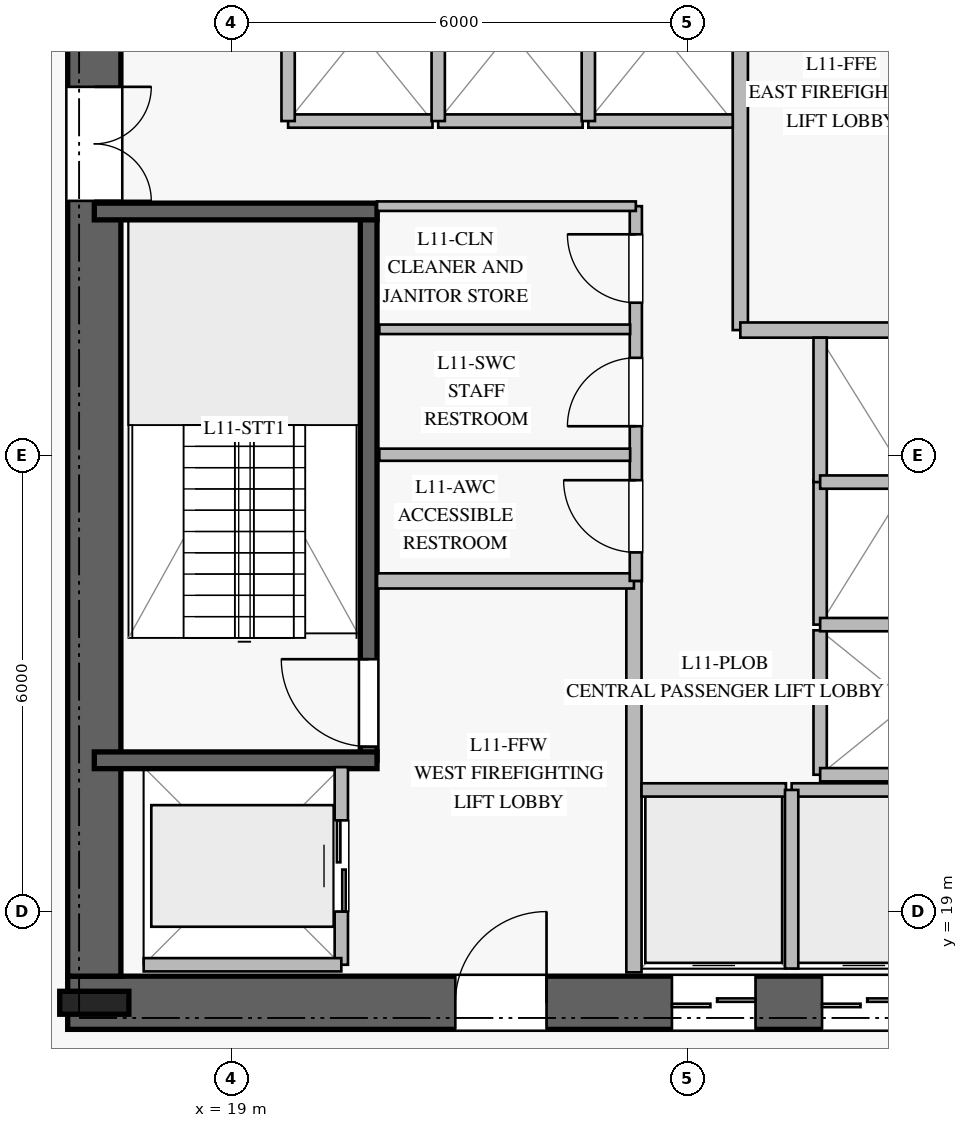
"""IFC4 building model, lengths in metres.
Left out: names, types, materials, properties, quantities, classifications, styles, units other than length and angle.
Written with IfcOpenShell. Run it as: python <this file> out.ifc"""

import sys

from ifc_helpers import new_model, si_unit, direction, frame, frame_2d, origin, origin_2d, place, context, subcontext, project, spatial, rectangle, i_section, extrude, element, fill, save


model = new_model("IFC4")
c1 = context("Model", 3, precision=1e-05, world=origin(), true_north=direction((0.0, 1.0)))
c2 = subcontext(c1, "Body", "Model", "MODEL_VIEW")
j1 = project(units=[si_unit("LENGTHUNIT", "METRE"), si_unit("PLANEANGLEUNIT", "RADIAN")], contexts=[c1])
p1 = place(None, origin())
s1 = spatial("IfcSite", under=j1, at=p1, CompositionType="ELEMENT")
p2 = place(p1, origin())
s2 = spatial("IfcBuilding", under=s1, at=p2, CompositionType="ELEMENT")
p3 = place(p2, frame((0.0, 0.0, 48.0)))
s3 = spatial("IfcBuildingStorey", under=s2, at=p3, CompositionType="ELEMENT", Elevation=48.0)
p4 = place(p3, frame((16.85, 17.8, 0.0), z_axis=(0.0, 0.0, 1.0), x_axis=(1.0, 0.0, 0.0)))
e1 = element("IfcWall", 1, at=p4, inside=s3, PredefinedType="SHEAR", context=c2, shape_type="SweptSolid", body=[
    extrude(rectangle(XDim=16.3, YDim=0.7, at=frame_2d((8.15, 0.0))), origin(), (0.0, 0.0, 1.0), 3.76),
])
p5 = place(p4, frame((5.1, 0.0, 0.0)))
e2 = element("IfcOpeningElement", 2, at=p5, cuts=e1, PredefinedType="OPENING", context=c2, shape_type="SweptSolid", body=[
    extrude(rectangle(XDim=1.2, YDim=2.25, at=frame_2d((0.6, 1.125))), frame((0.0, 0.36, 0.0), z_axis=(0.0, -1.0, 0.0), x_axis=(1.0, 0.0, 0.0)), (0.0, 0.0, 1.0), 0.72),
])
p6 = place(p4, frame((14.05, 0.0, 0.0)))
e3 = element("IfcOpeningElement", 3, at=p6, cuts=e1, PredefinedType="OPENING", context=c2, shape_type="SweptSolid", body=[
    extrude(rectangle(XDim=0.9, YDim=2.1, at=frame_2d((0.45, 1.05))), frame((0.0, 0.36, 0.0), z_axis=(0.0, -1.0, 0.0), x_axis=(1.0, 0.0, 0.0)), (0.0, 0.0, 1.0), 0.72),
])
p7 = place(p4, frame((7.95, 0.0, 0.0)))
e4 = element("IfcOpeningElement", 4, at=p7, cuts=e1, PredefinedType="OPENING", context=c2, shape_type="SweptSolid", body=[
    extrude(rectangle(XDim=1.1, YDim=2.2, at=frame_2d((0.55, 1.1))), frame((0.0, 0.36, 0.0), z_axis=(0.0, -1.0, 0.0), x_axis=(1.0, 0.0, 0.0)), (0.0, 0.0, 1.0), 0.72),
])
p8 = place(p4, frame((9.925, 0.0, 0.0)))
e5 = element("IfcOpeningElement", 5, at=p8, cuts=e1, PredefinedType="OPENING", context=c2, shape_type="SweptSolid", body=[
    extrude(rectangle(XDim=1.1, YDim=2.2, at=frame_2d((0.55, 1.1))), frame((0.0, 0.36, 0.0), z_axis=(0.0, -1.0, 0.0), x_axis=(1.0, 0.0, 0.0)), (0.0, 0.0, 1.0), 0.72),
])
p9 = place(p4, frame((11.9, 0.0, 0.0)))
e6 = element("IfcOpeningElement", 6, at=p9, cuts=e1, PredefinedType="OPENING", context=c2, shape_type="SweptSolid", body=[
    extrude(rectangle(XDim=1.1, YDim=2.2, at=frame_2d((0.55, 1.1))), frame((0.0, 0.36, 0.0), z_axis=(0.0, -1.0, 0.0), x_axis=(1.0, 0.0, 0.0)), (0.0, 0.0, 1.0), 0.72),
])
p10 = place(p3, frame((17.2, 31.85, 0.0), z_axis=(0.0, 0.0, 1.0), x_axis=(0.0, -1.0, 0.0)))
e7 = element("IfcWall", 7, at=p10, inside=s3, PredefinedType="SHEAR", context=c2, shape_type="SweptSolid", body=[
    extrude(rectangle(XDim=13.7, YDim=0.7, at=frame_2d((6.85, 0.0))), origin(), (0.0, 0.0, 1.0), 3.76),
])
p11 = place(p10, frame((2.0, 0.0, 0.0)))
e8 = element("IfcOpeningElement", 8, at=p11, cuts=e7, PredefinedType="OPENING", context=c2, shape_type="SweptSolid", body=[
    extrude(rectangle(XDim=1.5, YDim=2.2, at=frame_2d((0.75, 1.1))), frame((0.0, 0.36, 0.0), z_axis=(0.0, -1.0, 0.0), x_axis=(1.0, 0.0, 0.0)), (0.0, 0.0, 1.0), 0.72),
])
p12 = place(p3, frame((17.2, 17.8, 0.0), z_axis=(0.0, 0.0, 1.0), x_axis=(1.0, 0.0, 0.0)))
e9 = element("IfcColumn", 9, at=p12, inside=s3, PredefinedType="COLUMN", context=c2, shape_type="SweptSolid", body=[
    extrude(i_section(OverallWidth=0.302, OverallDepth=0.91, WebThickness=0.021, FlangeThickness=0.04, at=origin_2d()), origin(), (0.0, 0.0, 1.0), 4.0),
])
p13 = place(p3, frame((20.81, 20.99, 0.0), z_axis=(0.0, 0.0, 1.0), x_axis=(0.0, 1.0, 0.0)))
e10 = element("IfcWall", 10, at=p13, inside=s3, PredefinedType="SOLIDWALL", context=c2, shape_type="SweptSolid", body=[
    extrude(rectangle(XDim=7.22, YDim=0.22, at=frame_2d((3.61, 0.0))), origin(), (0.0, 0.0, 1.0), 3.76),
])
p14 = place(p13, frame((0.18, 0.0, 0.0)))
e11 = element("IfcOpeningElement", 11, at=p14, cuts=e10, PredefinedType="OPENING", context=c2, shape_type="SweptSolid", body=[
    extrude(rectangle(XDim=1.15, YDim=2.2, at=frame_2d((0.575, 1.1))), frame((0.0, 0.12, 0.0), z_axis=(0.0, -1.0, 0.0), x_axis=(1.0, 0.0, 0.0)), (0.0, 0.0, 1.0), 0.24),
])
for number, where, z_axis, x_axis in (
    (12, (17.2, 20.99, 0.0), (0.0, 0.0, 1.0), (1.0, 0.0, 0.0)),
    (13, (17.2, 28.21, 0.0), (0.0, 0.0, 1.0), (1.0, 0.0, 0.0)),
):
    element("IfcWall", number, at=place(p3, frame(where, z_axis=z_axis, x_axis=x_axis)), inside=s3, PredefinedType="SOLIDWALL", context=c2, shape_type="SweptSolid", body=[
        extrude(rectangle(XDim=3.72, YDim=0.22, at=frame_2d((1.86, 0.0))), origin(), (0.0, 0.0, 1.0), 3.76),
    ])
p15 = place(p3, frame((24.3, 18.2, 0.0), z_axis=(0.0, 0.0, 1.0), x_axis=(0.0, 1.0, 0.0)))
e14 = element("IfcWall", 14, at=p15, inside=s3, PredefinedType="PARTITIONING", context=c2, shape_type="SweptSolid", body=[
    extrude(rectangle(XDim=5.15, YDim=0.2, at=frame_2d((2.575, 0.0))), origin(), (0.0, 0.0, 1.0), 3.76),
])
p16 = place(p3, frame((20.92, 23.35, 0.0), z_axis=(0.0, 0.0, 1.0), x_axis=(1.0, 0.0, 0.0)))
e15 = element("IfcWall", 15, at=p16, inside=s3, PredefinedType="PARTITIONING", context=c2, shape_type="SweptSolid", body=[
    extrude(rectangle(XDim=3.38, YDim=0.2, at=frame_2d((1.69, 0.0))), origin(), (0.0, 0.0, 1.0), 3.76),
])
p17 = place(p3, frame((25.7, 26.65, 0.0), z_axis=(0.0, 0.0, 1.0), x_axis=(0.0, 1.0, 0.0)))
e16 = element("IfcWall", 16, at=p17, inside=s3, PredefinedType="PARTITIONING", context=c2, shape_type="SweptSolid", body=[
    extrude(rectangle(XDim=5.15, YDim=0.2, at=frame_2d((2.575, 0.0))), origin(), (0.0, 0.0, 1.0), 3.76),
])
p18 = place(p3, frame((25.7, 26.65, 0.0), z_axis=(0.0, 0.0, 1.0), x_axis=(1.0, 0.0, 0.0)))
e17 = element("IfcWall", 17, at=p18, inside=s3, PredefinedType="PARTITIONING", context=c2, shape_type="SweptSolid", body=[
    extrude(rectangle(XDim=3.38, YDim=0.2, at=frame_2d((1.69, 0.0))), origin(), (0.0, 0.0, 1.0), 3.76),
])
p19 = place(p3, frame((24.325, 23.35, 0.0), z_axis=(0.0, 0.0, 1.0), x_axis=(0.0, 1.0, 0.0)))
e18 = element("IfcWall", 18, at=p19, inside=s3, PredefinedType="PLUMBINGWALL", context=c2, shape_type="SweptSolid", body=[
    extrude(rectangle(XDim=4.93, YDim=0.16, at=frame_2d((2.465, 0.0))), origin(), (0.0, 0.0, 1.0), 3.76),
])
p20 = place(p19, frame((0.375, 0.0, 0.0)))
e19 = element("IfcOpeningElement", 19, at=p20, cuts=e18, PredefinedType="OPENING", context=c2, shape_type="SweptSolid", body=[
    extrude(rectangle(XDim=0.95, YDim=2.1, at=frame_2d((0.475, 1.05))), frame((0.0, 0.09, 0.0), z_axis=(0.0, -1.0, 0.0), x_axis=(1.0, 0.0, 0.0)), (0.0, 0.0, 1.0), 0.18),
])
p21 = place(p19, frame((2.035, 0.0, 0.0)))
e20 = element("IfcOpeningElement", 20, at=p21, cuts=e18, PredefinedType="OPENING", context=c2, shape_type="SweptSolid", body=[
    extrude(rectangle(XDim=0.9, YDim=2.1, at=frame_2d((0.45, 1.05))), frame((0.0, 0.09, 0.0), z_axis=(0.0, -1.0, 0.0), x_axis=(1.0, 0.0, 0.0)), (0.0, 0.0, 1.0), 0.18),
])
p22 = place(p19, frame((3.66, 0.0, 0.0)))
e21 = element("IfcOpeningElement", 21, at=p22, cuts=e18, PredefinedType="OPENING", context=c2, shape_type="SweptSolid", body=[
    extrude(rectangle(XDim=0.9, YDim=2.1, at=frame_2d((0.45, 1.05))), frame((0.0, 0.09, 0.0), z_axis=(0.0, -1.0, 0.0), x_axis=(1.0, 0.0, 0.0)), (0.0, 0.0, 1.0), 0.18),
])
p23 = place(p3, frame((20.92, 28.28, 0.0), z_axis=(0.0, 0.0, 1.0), x_axis=(1.0, 0.0, 0.0)))
e22 = element("IfcWall", 22, at=p23, inside=s3, PredefinedType="PARTITIONING", context=c2, shape_type="SweptSolid", body=[
    extrude(rectangle(XDim=3.405, YDim=0.125, at=frame_2d((1.703, 0.0))), origin(), (0.0, 0.0, 1.0), 3.76),
])
p24 = place(p3, frame((20.95, 25.01, 0.0), z_axis=(0.0, 0.0, 1.0), x_axis=(1.0, 0.0, 0.0)))
e23 = element("IfcWall", 23, at=p24, inside=s3, PredefinedType="PLUMBINGWALL", context=c2, shape_type="SweptSolid", body=[
    extrude(rectangle(XDim=3.3, YDim=0.16, at=frame_2d((1.65, 0.0))), origin(), (0.0, 0.0, 1.0), 3.76),
])
p25 = place(p3, frame((20.95, 26.66, 0.0), z_axis=(0.0, 0.0, 1.0), x_axis=(1.0, 0.0, 0.0)))
e24 = element("IfcWall", 24, at=p25, inside=s3, PredefinedType="PARTITIONING", context=c2, shape_type="SweptSolid", body=[
    extrude(rectangle(XDim=3.3, YDim=0.125, at=frame_2d((1.65, 0.0))), origin(), (0.0, 0.0, 1.0), 3.76),
])
p26 = place(p3, frame((24.4, 20.6, 0.0), z_axis=(0.0, 0.0, 1.0), x_axis=(1.0, 0.0, 0.0)))
e25 = element("IfcWall", 25, at=p26, inside=s3, PredefinedType="PARTITIONING", context=c2, shape_type="SweptSolid", body=[
    extrude(rectangle(XDim=1.9, YDim=0.175, at=frame_2d((0.95, 0.0))), origin(), (0.0, 0.0, 1.0), 3.76),
])
p27 = place(p3, frame((26.375, 20.6, 0.0), z_axis=(0.0, 0.0, 1.0), x_axis=(1.0, 0.0, 0.0)))
e26 = element("IfcWall", 26, at=p27, inside=s3, PredefinedType="PARTITIONING", context=c2, shape_type="SweptSolid", body=[
    extrude(rectangle(XDim=1.9, YDim=0.175, at=frame_2d((0.95, 0.0))), origin(), (0.0, 0.0, 1.0), 3.76),
])
p28 = place(p3, frame((26.375, 18.25, 0.0), z_axis=(0.0, 0.0, 1.0), x_axis=(0.0, 1.0, 0.0)))
e27 = element("IfcWall", 27, at=p28, inside=s3, PredefinedType="PARTITIONING", context=c2, shape_type="SweptSolid", body=[
    extrude(rectangle(XDim=2.35, YDim=0.175, at=frame_2d((1.175, 0.0))), origin(), (0.0, 0.0, 1.0), 3.76),
])
p29 = place(p3, frame((19.75, 29.4, 0.0), z_axis=(0.0, 0.0, 1.0), x_axis=(1.0, 0.0, 0.0)))
e28 = element("IfcWall", 28, at=p29, inside=s3, PredefinedType="PARTITIONING", context=c2, shape_type="SweptSolid", body=[
    extrude(rectangle(XDim=1.9, YDim=0.175, at=frame_2d((0.95, 0.0))), origin(), (0.0, 0.0, 1.0), 3.76),
])
p30 = place(p3, frame((19.75, 29.4, 0.0), z_axis=(0.0, 0.0, 1.0), x_axis=(0.0, 1.0, 0.0)))
e29 = element("IfcWall", 29, at=p30, inside=s3, PredefinedType="PARTITIONING", context=c2, shape_type="SweptSolid", body=[
    extrude(rectangle(XDim=2.35, YDim=0.175, at=frame_2d((1.175, 0.0))), origin(), (0.0, 0.0, 1.0), 3.76),
])
p31 = place(p3, frame((21.725, 29.4, 0.0), z_axis=(0.0, 0.0, 1.0), x_axis=(1.0, 0.0, 0.0)))
e30 = element("IfcWall", 30, at=p31, inside=s3, PredefinedType="PARTITIONING", context=c2, shape_type="SweptSolid", body=[
    extrude(rectangle(XDim=1.9, YDim=0.175, at=frame_2d((0.95, 0.0))), origin(), (0.0, 0.0, 1.0), 3.76),
])
p32 = place(p3, frame((21.725, 29.4, 0.0), z_axis=(0.0, 0.0, 1.0), x_axis=(0.0, 1.0, 0.0)))
e31 = element("IfcWall", 31, at=p32, inside=s3, PredefinedType="PARTITIONING", context=c2, shape_type="SweptSolid", body=[
    extrude(rectangle(XDim=2.35, YDim=0.175, at=frame_2d((1.175, 0.0))), origin(), (0.0, 0.0, 1.0), 3.76),
])
p33 = place(p3, frame((23.7, 29.4, 0.0), z_axis=(0.0, 0.0, 1.0), x_axis=(1.0, 0.0, 0.0)))
e32 = element("IfcWall", 32, at=p33, inside=s3, PredefinedType="PARTITIONING", context=c2, shape_type="SweptSolid", body=[
    extrude(rectangle(XDim=1.9, YDim=0.175, at=frame_2d((0.95, 0.0))), origin(), (0.0, 0.0, 1.0), 3.76),
])
p34 = place(p3, frame((23.7, 29.4, 0.0), z_axis=(0.0, 0.0, 1.0), x_axis=(0.0, 1.0, 0.0)))
e33 = element("IfcWall", 33, at=p34, inside=s3, PredefinedType="PARTITIONING", context=c2, shape_type="SweptSolid", body=[
    extrude(rectangle(XDim=2.35, YDim=0.175, at=frame_2d((1.175, 0.0))), origin(), (0.0, 0.0, 1.0), 3.76),
])
p35 = place(p3, frame((26.75, 20.8, 0.0), z_axis=(0.0, 0.0, 1.0), x_axis=(0.0, 1.0, 0.0)))
e34 = element("IfcWall", 34, at=p35, inside=s3, PredefinedType="PARTITIONING", context=c2, shape_type="SweptSolid", body=[
    extrude(rectangle(XDim=1.9, YDim=0.175, at=frame_2d((0.95, 0.0))), origin(), (0.0, 0.0, 1.0), 3.76),
])
p36 = place(p3, frame((26.75, 20.8, 0.0), z_axis=(0.0, 0.0, 1.0), x_axis=(1.0, 0.0, 0.0)))
e35 = element("IfcWall", 35, at=p36, inside=s3, PredefinedType="PARTITIONING", context=c2, shape_type="SweptSolid", body=[
    extrude(rectangle(XDim=2.35, YDim=0.175, at=frame_2d((1.175, 0.0))), origin(), (0.0, 0.0, 1.0), 3.76),
])
p37 = place(p3, frame((26.75, 22.775, 0.0), z_axis=(0.0, 0.0, 1.0), x_axis=(0.0, 1.0, 0.0)))
e36 = element("IfcWall", 36, at=p37, inside=s3, PredefinedType="PARTITIONING", context=c2, shape_type="SweptSolid", body=[
    extrude(rectangle(XDim=1.9, YDim=0.175, at=frame_2d((0.95, 0.0))), origin(), (0.0, 0.0, 1.0), 3.76),
])
p38 = place(p3, frame((26.75, 22.775, 0.0), z_axis=(0.0, 0.0, 1.0), x_axis=(1.0, 0.0, 0.0)))
e37 = element("IfcWall", 37, at=p38, inside=s3, PredefinedType="PARTITIONING", context=c2, shape_type="SweptSolid", body=[
    extrude(rectangle(XDim=2.35, YDim=0.175, at=frame_2d((1.175, 0.0))), origin(), (0.0, 0.0, 1.0), 3.76),
])
p39 = place(p3, frame((26.75, 24.65, 0.0), z_axis=(0.0, 0.0, 1.0), x_axis=(0.0, 1.0, 0.0)))
e38 = element("IfcWall", 38, at=p39, inside=s3, PredefinedType="PARTITIONING", context=c2, shape_type="SweptSolid", body=[
    extrude(rectangle(XDim=1.9, YDim=0.175, at=frame_2d((0.95, 0.0))), origin(), (0.0, 0.0, 1.0), 3.76),
])
p40 = place(p3, frame((26.75, 24.65, 0.0), z_axis=(0.0, 0.0, 1.0), x_axis=(1.0, 0.0, 0.0)))
e39 = element("IfcWall", 39, at=p40, inside=s3, PredefinedType="PARTITIONING", context=c2, shape_type="SweptSolid", body=[
    extrude(rectangle(XDim=2.35, YDim=0.175, at=frame_2d((1.175, 0.0))), origin(), (0.0, 0.0, 1.0), 3.76),
])
p41 = place(p3, frame((20.45, 18.3, 0.0), z_axis=(0.0, 0.0, 1.0), x_axis=(0.0, 1.0, 0.0)))
e40 = element("IfcWall", 40, at=p41, inside=s3, PredefinedType="PARTITIONING", context=c2, shape_type="SweptSolid", body=[
    extrude(rectangle(XDim=2.6, YDim=0.175, at=frame_2d((1.3, 0.0))), origin(), (0.0, 0.0, 1.0), 3.76),
])
p42 = place(p41, frame((0.7, 0.0, 0.0)))
e41 = element("IfcOpeningElement", 41, at=p42, cuts=e40, PredefinedType="OPENING", context=c2, shape_type="SweptSolid", body=[
    extrude(rectangle(XDim=1.2, YDim=2.2, at=frame_2d((0.6, 1.1))), frame((0.0, 0.098, 0.0), z_axis=(0.0, -1.0, 0.0), x_axis=(1.0, 0.0, 0.0)), (0.0, 0.0, 1.0), 0.195),
])
p43 = place(p3, frame((17.85, 18.3, 0.0), z_axis=(0.0, 0.0, 1.0), x_axis=(1.0, 0.0, 0.0)))
e42 = element("IfcWall", 42, at=p43, inside=s3, PredefinedType="PARTITIONING", context=c2, shape_type="SweptSolid", body=[
    extrude(rectangle(XDim=2.6, YDim=0.175, at=frame_2d((1.3, 0.0))), origin(), (0.0, 0.0, 1.0), 3.76),
])
p44 = place(p14, origin())
e43 = element("IfcDoor", 43, at=p44, inside=s3, OperationType="SINGLE_SWING_RIGHT", PredefinedType="DOOR", context=c2, shape_type="SweptSolid", body=[
    extrude(rectangle(XDim=1.15, YDim=2.2, at=frame_2d((0.575, 1.1))), frame((0.0, 0.025, 0.0), z_axis=(0.0, -1.0, 0.0), x_axis=(1.0, 0.0, 0.0)), (0.0, 0.0, 1.0), 0.05),
])
fill(e11, e43)
p45 = place(p5, origin())
e44 = element("IfcDoor", 44, at=p45, inside=s3, OperationType="SINGLE_SWING_RIGHT", PredefinedType="DOOR", context=c2, shape_type="SweptSolid", body=[
    extrude(rectangle(XDim=1.2, YDim=2.25, at=frame_2d((0.6, 1.125))), frame((0.0, 0.025, 0.0), z_axis=(0.0, -1.0, 0.0), x_axis=(1.0, 0.0, 0.0)), (0.0, 0.0, 1.0), 0.05),
])
fill(e2, e44)
p46 = place(p11, origin())
e45 = element("IfcDoor", 45, at=p46, inside=s3, OperationType="DOUBLE_DOOR_SINGLE_SWING", PredefinedType="DOOR", context=c2, shape_type="SweptSolid", body=[
    extrude(rectangle(XDim=1.5, YDim=2.2, at=frame_2d((0.75, 1.1))), frame((0.0, 0.025, 0.0), z_axis=(0.0, -1.0, 0.0), x_axis=(1.0, 0.0, 0.0)), (0.0, 0.0, 1.0), 0.05),
])
fill(e8, e45)
p47 = place(p20, origin())
e46 = element("IfcDoor", 46, at=p47, inside=s3, OperationType="SINGLE_SWING_RIGHT", PredefinedType="DOOR", context=c2, shape_type="SweptSolid", body=[
    extrude(rectangle(XDim=0.95, YDim=2.1, at=frame_2d((0.475, 1.05))), frame((0.0, 0.025, 0.0), z_axis=(0.0, -1.0, 0.0), x_axis=(1.0, 0.0, 0.0)), (0.0, 0.0, 1.0), 0.05),
])
fill(e19, e46)
p48 = place(p21, origin())
e47 = element("IfcDoor", 47, at=p48, inside=s3, OperationType="SINGLE_SWING_LEFT", PredefinedType="DOOR", context=c2, shape_type="SweptSolid", body=[
    extrude(rectangle(XDim=0.9, YDim=2.1, at=frame_2d((0.45, 1.05))), frame((0.0, 0.025, 0.0), z_axis=(0.0, -1.0, 0.0), x_axis=(1.0, 0.0, 0.0)), (0.0, 0.0, 1.0), 0.05),
])
fill(e20, e47)
p49 = place(p22, origin())
e48 = element("IfcDoor", 48, at=p49, inside=s3, OperationType="SINGLE_SWING_RIGHT", PredefinedType="DOOR", context=c2, shape_type="SweptSolid", body=[
    extrude(rectangle(XDim=0.9, YDim=2.1, at=frame_2d((0.45, 1.05))), frame((0.0, 0.025, 0.0), z_axis=(0.0, -1.0, 0.0), x_axis=(1.0, 0.0, 0.0)), (0.0, 0.0, 1.0), 0.05),
])
fill(e21, e48)
p50 = place(p7, origin())
e49 = element("IfcDoor", 49, at=p50, inside=s3, OperationType="DOUBLE_DOOR_SLIDING", PredefinedType="DOOR", context=c2, shape_type="SweptSolid", body=[
    extrude(rectangle(XDim=1.1, YDim=2.2, at=frame_2d((0.55, 1.1))), frame((0.0, 0.025, 0.0), z_axis=(0.0, -1.0, 0.0), x_axis=(1.0, 0.0, 0.0)), (0.0, 0.0, 1.0), 0.05),
])
fill(e4, e49)
p51 = place(p8, origin())
e50 = element("IfcDoor", 50, at=p51, inside=s3, OperationType="DOUBLE_DOOR_SLIDING", PredefinedType="DOOR", context=c2, shape_type="SweptSolid", body=[
    extrude(rectangle(XDim=1.1, YDim=2.2, at=frame_2d((0.55, 1.1))), frame((0.0, 0.025, 0.0), z_axis=(0.0, -1.0, 0.0), x_axis=(1.0, 0.0, 0.0)), (0.0, 0.0, 1.0), 0.05),
])
fill(e5, e50)
p52 = place(p42, origin())
e51 = element("IfcDoor", 51, at=p52, inside=s3, OperationType="DOUBLE_DOOR_SLIDING", PredefinedType="DOOR", context=c2, shape_type="SweptSolid", body=[
    extrude(rectangle(XDim=1.2, YDim=2.2, at=frame_2d((0.6, 1.1))), frame((0.0, 0.025, 0.0), z_axis=(0.0, -1.0, 0.0), x_axis=(1.0, 0.0, 0.0)), (0.0, 0.0, 1.0), 0.05),
])
fill(e41, e51)
save(model, sys.argv[1])
